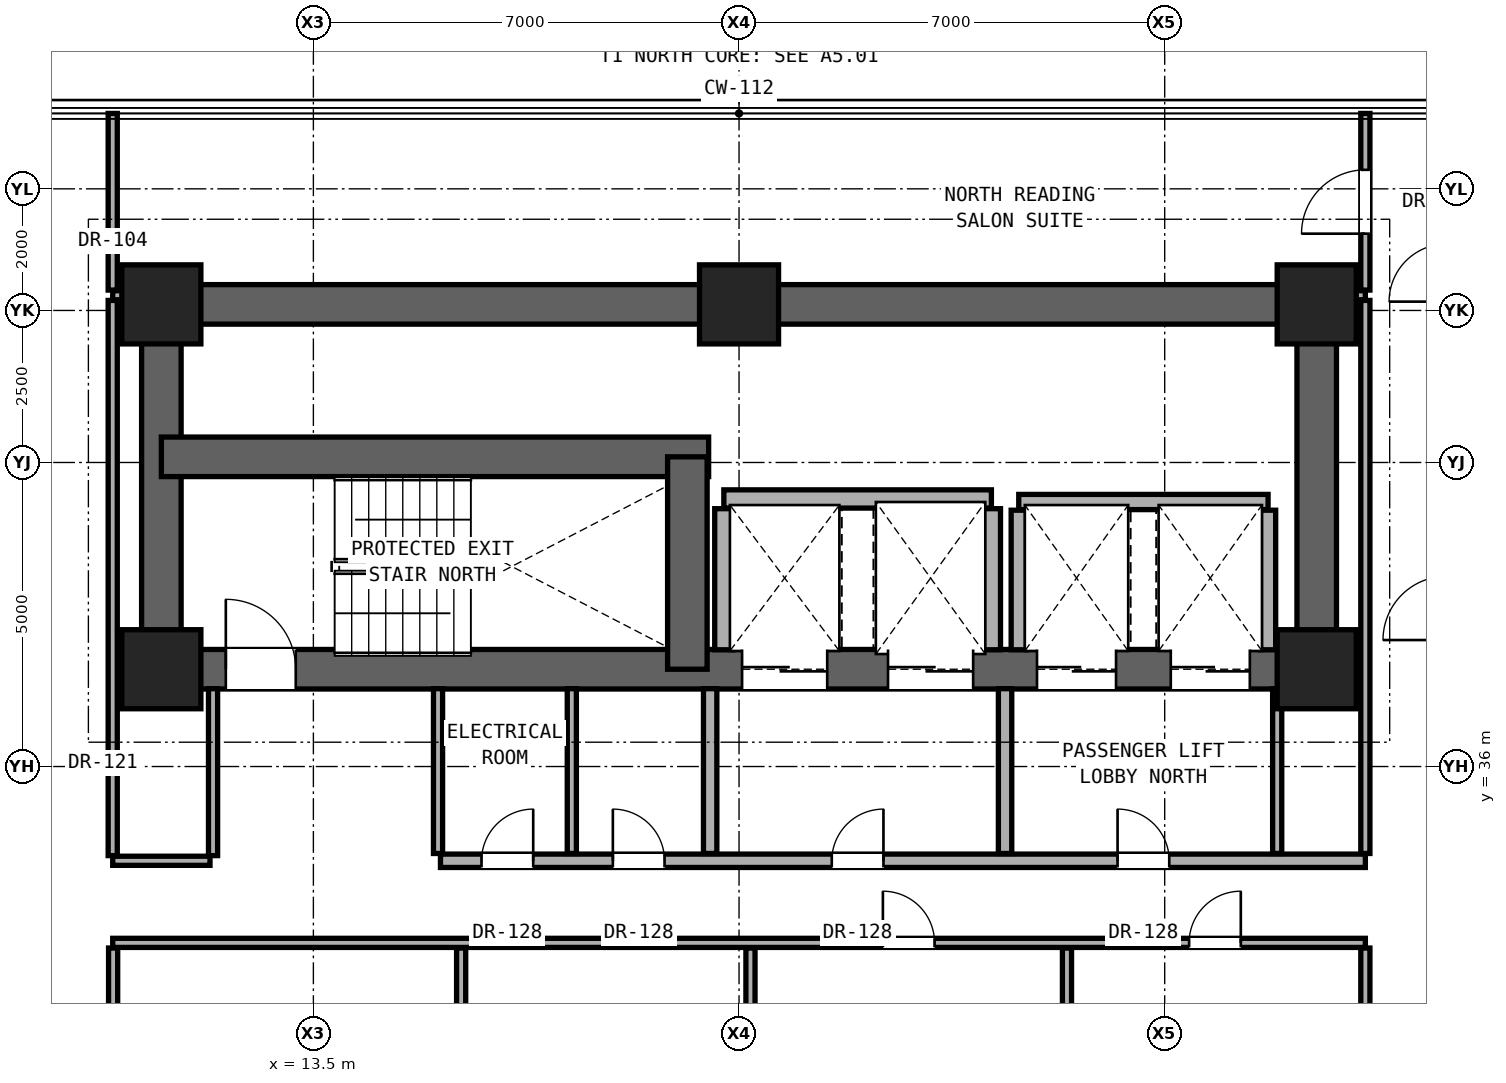
"""IFC4 building model, lengths in metres.
Left out: names, types, materials, properties, quantities, classifications, styles, units other than length and angle.
Written with IfcOpenShell. Run it as: python <this file> out.ifc"""

import sys

from ifc_helpers import new_model, si_unit, direction, frame, frame_2d, origin, origin_2d, place, context, subcontext, project, spatial, rectangle, extrude, element, fill, save


model = new_model("IFC4")
c1 = context("Model", 3, precision=1e-05, world=origin(), true_north=direction((0.0, 1.0)))
c2 = subcontext(c1, "Body", "Model", "MODEL_VIEW")
j1 = project(units=[si_unit("LENGTHUNIT", "METRE"), si_unit("PLANEANGLEUNIT", "RADIAN")], contexts=[c1])
p1 = place(None, origin())
s1 = spatial("IfcSite", under=j1, at=p1, CompositionType="ELEMENT")
p2 = place(p1, origin())
s2 = spatial("IfcBuilding", under=s1, at=p2, CompositionType="ELEMENT")
p3 = place(p2, frame((0.0, 0.0, 52.1)))
s3 = spatial("IfcBuildingStorey", under=s2, at=p3, CompositionType="ELEMENT", Elevation=52.1)
for number, where, z_axis, x_axis in (
    (1, (11.0, 37.6, 0.0), (0.0, 0.0, 1.0), (1.0, 0.0, 0.0)),
    (2, (30.0, 37.6, 0.0), (0.0, 0.0, 1.0), (1.0, 0.0, 0.0)),
    (3, (11.0, 43.6, 0.0), (0.0, 0.0, 1.0), (1.0, 0.0, 0.0)),
    (4, (20.5, 43.6, 0.0), (0.0, 0.0, 1.0), (1.0, 0.0, 0.0)),
    (5, (30.0, 43.6, 0.0), (0.0, 0.0, 1.0), (1.0, 0.0, 0.0)),
):
    element("IfcColumn", number, at=place(p3, frame(where, z_axis=z_axis, x_axis=x_axis)), inside=s3, PredefinedType="COLUMN", context=c2, shape_type="SweptSolid", body=[
        extrude(rectangle(XDim=1.3, YDim=1.3, at=origin_2d()), origin(), (0.0, 0.0, 1.0), 3.3),
    ])
p4 = place(p3, frame((11.0, 43.6, 0.0), z_axis=(0.0, 0.0, 1.0), x_axis=(1.0, 0.0, 0.0)))
e6 = element("IfcWall", 6, at=p4, inside=s3, PredefinedType="SHEAR", context=c2, shape_type="SweptSolid", body=[
    extrude(rectangle(XDim=19.0, YDim=0.65, at=frame_2d((9.5, 0.0))), origin(), (0.0, 0.0, 1.0), 3.06),
])
for number, where, z_axis, x_axis in (
    (7, (11.0, 37.6, 0.0), (0.0, 0.0, 1.0), (0.0, 1.0, 0.0)),
    (8, (30.0, 37.6, 0.0), (0.0, 0.0, 1.0), (0.0, 1.0, 0.0)),
):
    element("IfcWall", number, at=place(p3, frame(where, z_axis=z_axis, x_axis=x_axis)), inside=s3, PredefinedType="SHEAR", context=c2, shape_type="SweptSolid", body=[
        extrude(rectangle(XDim=6.0, YDim=0.65, at=frame_2d((3.0, 0.0))), origin(), (0.0, 0.0, 1.0), 3.06),
    ])
p5 = place(p3, frame((11.0, 37.6, 0.0), z_axis=(0.0, 0.0, 1.0), x_axis=(1.0, 0.0, 0.0)))
e9 = element("IfcWall", 9, at=p5, inside=s3, PredefinedType="SHEAR", context=c2, shape_type="SweptSolid", body=[
    extrude(rectangle(XDim=19.0, YDim=0.65, at=frame_2d((9.5, 0.0))), origin(), (0.0, 0.0, 1.0), 3.06),
])
p6 = place(p5, frame((1.06, 0.0, 0.0)))
e10 = element("IfcOpeningElement", 10, at=p6, cuts=e9, PredefinedType="OPENING", context=c2, shape_type="SweptSolid", body=[
    extrude(rectangle(XDim=1.15, YDim=2.2, at=frame_2d((0.575, 1.1))), frame((0.0, 0.335, 0.0), z_axis=(0.0, -1.0, 0.0), x_axis=(1.0, 0.0, 0.0)), (0.0, 0.0, 1.0), 0.67),
])
p7 = place(p5, frame((9.55, 0.0, 0.0)))
e11 = element("IfcOpeningElement", 11, at=p7, cuts=e9, PredefinedType="OPENING", context=c2, shape_type="SweptSolid", body=[
    extrude(rectangle(XDim=1.4, YDim=2.35, at=frame_2d((0.7, 1.175))), frame((0.0, 0.335, 0.0), z_axis=(0.0, -1.0, 0.0), x_axis=(1.0, 0.0, 0.0)), (0.0, 0.0, 1.0), 0.67),
])
p8 = place(p5, frame((11.95, 0.0, 0.0)))
e12 = element("IfcOpeningElement", 12, at=p8, cuts=e9, PredefinedType="OPENING", context=c2, shape_type="SweptSolid", body=[
    extrude(rectangle(XDim=1.4, YDim=2.35, at=frame_2d((0.7, 1.175))), frame((0.0, 0.335, 0.0), z_axis=(0.0, -1.0, 0.0), x_axis=(1.0, 0.0, 0.0)), (0.0, 0.0, 1.0), 0.67),
])
p9 = place(p5, frame((14.4, 0.0, 0.0)))
e13 = element("IfcOpeningElement", 13, at=p9, cuts=e9, PredefinedType="OPENING", context=c2, shape_type="SweptSolid", body=[
    extrude(rectangle(XDim=1.3, YDim=2.3, at=frame_2d((0.65, 1.15))), frame((0.0, 0.335, 0.0), z_axis=(0.0, -1.0, 0.0), x_axis=(1.0, 0.0, 0.0)), (0.0, 0.0, 1.0), 0.67),
])
p10 = place(p5, frame((16.6, 0.0, 0.0)))
e14 = element("IfcOpeningElement", 14, at=p10, cuts=e9, PredefinedType="OPENING", context=c2, shape_type="SweptSolid", body=[
    extrude(rectangle(XDim=1.3, YDim=2.3, at=frame_2d((0.65, 1.15))), frame((0.0, 0.335, 0.0), z_axis=(0.0, -1.0, 0.0), x_axis=(1.0, 0.0, 0.0)), (0.0, 0.0, 1.0), 0.67),
])
p11 = place(p3, frame((11.0, 41.093, 0.0), z_axis=(0.0, 0.0, 1.0), x_axis=(1.0, 0.0, 0.0)))
e15 = element("IfcWall", 15, at=p11, inside=s3, PredefinedType="SHEAR", context=c2, shape_type="SweptSolid", body=[
    extrude(rectangle(XDim=9.0, YDim=0.65, at=frame_2d((4.5, 0.0))), origin(), (0.0, 0.0, 1.0), 3.06),
])
p12 = place(p3, frame((19.65, 37.6, 0.0), z_axis=(0.0, 0.0, 1.0), x_axis=(0.0, 1.0, 0.0)))
e16 = element("IfcWall", 16, at=p12, inside=s3, PredefinedType="SHEAR", context=c2, shape_type="SweptSolid", body=[
    extrude(rectangle(XDim=3.493, YDim=0.65, at=frame_2d((1.747, 0.0))), origin(), (0.0, 0.0, 1.0), 3.06),
])
p13 = place(p3, frame((10.2, 33.1, 0.0), z_axis=(0.0, 0.0, 1.0), x_axis=(1.0, 0.0, 0.0)))
e17 = element("IfcWall", 17, at=p13, inside=s3, PredefinedType="PARTITIONING", context=c2, shape_type="SweptSolid", body=[
    extrude(rectangle(XDim=20.6, YDim=0.15, at=frame_2d((10.3, 0.0))), origin(), (0.0, 0.0, 1.0), 2.104),
])
p14 = place(p13, frame((12.666, 0.0, 0.0)))
e18 = element("IfcOpeningElement", 18, at=p14, cuts=e17, PredefinedType="OPENING", context=c2, shape_type="SweptSolid", body=[
    extrude(rectangle(XDim=0.85, YDim=2.01, at=frame_2d((0.425, 1.005))), frame((0.0, 0.085, 0.0), z_axis=(0.0, -1.0, 0.0), x_axis=(1.0, 0.0, 0.0)), (0.0, 0.0, 1.0), 0.17),
])
p15 = place(p13, frame((17.701, 0.0, 0.0)))
e19 = element("IfcOpeningElement", 19, at=p15, cuts=e17, PredefinedType="OPENING", context=c2, shape_type="SweptSolid", body=[
    extrude(rectangle(XDim=0.85, YDim=2.01, at=frame_2d((0.425, 1.005))), frame((0.0, 0.085, 0.0), z_axis=(0.0, -1.0, 0.0), x_axis=(1.0, 0.0, 0.0)), (0.0, 0.0, 1.0), 0.17),
])
p16 = place(p3, frame((10.2, 34.45, 0.0), z_axis=(0.0, 0.0, 1.0), x_axis=(1.0, 0.0, 0.0)))
e20 = element("IfcWall", 20, at=p16, inside=s3, PredefinedType="PARTITIONING", context=c2, shape_type="SweptSolid", body=[
    extrude(rectangle(XDim=1.6, YDim=0.15, at=frame_2d((0.8, 0.0))), origin(), (0.0, 0.0, 1.0), 2.104),
])
p17 = place(p3, frame((15.59, 34.45, 0.0), z_axis=(0.0, 0.0, 1.0), x_axis=(1.0, 0.0, 0.0)))
e21 = element("IfcWall", 21, at=p17, inside=s3, PredefinedType="SOLIDWALL", context=c2, shape_type="SweptSolid", body=[
    extrude(rectangle(XDim=15.21, YDim=0.22, at=frame_2d((7.605, 0.0))), origin(), (0.0, 0.0, 1.0), 2.104),
])
p18 = place(p17, frame((6.435, 0.0, 0.0)))
e22 = element("IfcOpeningElement", 22, at=p18, cuts=e21, PredefinedType="OPENING", context=c2, shape_type="SweptSolid", body=[
    extrude(rectangle(XDim=0.85, YDim=2.01, at=frame_2d((0.425, 1.005))), frame((0.0, 0.12, 0.0), z_axis=(0.0, -1.0, 0.0), x_axis=(1.0, 0.0, 0.0)), (0.0, 0.0, 1.0), 0.24),
])
p19 = place(p17, frame((11.135, 0.0, 0.0)))
e23 = element("IfcOpeningElement", 23, at=p19, cuts=e21, PredefinedType="OPENING", context=c2, shape_type="SweptSolid", body=[
    extrude(rectangle(XDim=0.85, YDim=2.01, at=frame_2d((0.425, 1.005))), frame((0.0, 0.12, 0.0), z_axis=(0.0, -1.0, 0.0), x_axis=(1.0, 0.0, 0.0)), (0.0, 0.0, 1.0), 0.24),
])
p20 = place(p17, frame((0.675, 0.0, 0.0)))
e24 = element("IfcOpeningElement", 24, at=p20, cuts=e21, PredefinedType="OPENING", context=c2, shape_type="SweptSolid", body=[
    extrude(rectangle(XDim=0.85, YDim=2.01, at=frame_2d((0.425, 1.005))), frame((0.0, 0.12, 0.0), z_axis=(0.0, -1.0, 0.0), x_axis=(1.0, 0.0, 0.0)), (0.0, 0.0, 1.0), 0.24),
])
p21 = place(p17, frame((2.835, 0.0, 0.0)))
e25 = element("IfcOpeningElement", 25, at=p21, cuts=e21, PredefinedType="OPENING", context=c2, shape_type="SweptSolid", body=[
    extrude(rectangle(XDim=0.85, YDim=2.01, at=frame_2d((0.425, 1.005))), frame((0.0, 0.12, 0.0), z_axis=(0.0, -1.0, 0.0), x_axis=(1.0, 0.0, 0.0)), (0.0, 0.0, 1.0), 0.24),
])
p22 = place(p3, frame((25.1, 40.35, 0.0), z_axis=(0.0, 0.0, 1.0), x_axis=(1.0, 0.0, 0.0)))
e26 = element("IfcWall", 26, at=p22, inside=s3, PredefinedType="SOLIDWALL", context=c2, shape_type="SweptSolid", body=[
    extrude(rectangle(XDim=4.1, YDim=0.25, at=frame_2d((2.05, 0.0))), origin(), (0.0, 0.0, 1.0), 3.06),
])
p23 = place(p3, frame((20.25, 40.4, 0.0), z_axis=(0.0, 0.0, 1.0), x_axis=(1.0, 0.0, 0.0)))
e27 = element("IfcWall", 27, at=p23, inside=s3, PredefinedType="SOLIDWALL", context=c2, shape_type="SweptSolid", body=[
    extrude(rectangle(XDim=4.4, YDim=0.3, at=frame_2d((2.2, 0.0))), origin(), (0.0, 0.0, 1.0), 3.06),
])
for number, where, z_axis, x_axis in (
    (28, (10.2, 43.75, 0.0), (0.0, 0.0, 1.0), (1.0, 0.0, 0.0)),
    (29, (30.32, 43.75, 0.0), (0.0, 0.0, 1.0), (1.0, 0.0, 0.0)),
):
    element("IfcWall", number, at=place(p3, frame(where, z_axis=z_axis, x_axis=x_axis)), inside=s3, PredefinedType="PARTITIONING", context=c2, shape_type="SweptSolid", body=[
        extrude(rectangle(XDim=0.48, YDim=0.15, at=frame_2d((0.24, 0.0))), origin(), (0.0, 0.0, 1.0), 3.06),
    ])
p24 = place(p3, frame((10.207, 22.935, 0.0), z_axis=(0.0, 0.0, 1.0), x_axis=(0.0, 1.0, 0.0)))
e30 = element("IfcWall", 30, at=p24, inside=s3, PredefinedType="PARTITIONING", context=c2, shape_type="SweptSolid", body=[
    extrude(rectangle(XDim=10.08, YDim=0.15, at=frame_2d((5.04, 0.0))), origin(), (0.0, 0.0, 1.0), 2.279),
])
p25 = place(p24, frame((4.565, 0.0, 0.0)))
e31 = element("IfcOpeningElement", 31, at=p25, cuts=e30, PredefinedType="OPENING", context=c2, shape_type="SweptSolid", body=[
    extrude(rectangle(XDim=0.95, YDim=2.15, at=frame_2d((0.475, 1.075))), frame((0.0, 0.085, 0.0), z_axis=(0.0, -1.0, 0.0), x_axis=(1.0, 0.0, 0.0)), (0.0, 0.0, 1.0), 0.17),
])
p26 = place(p3, frame((10.2, 34.535, 0.0), z_axis=(0.0, 0.0, 1.0), x_axis=(0.0, 1.0, 0.0)))
e32 = element("IfcWall", 32, at=p26, inside=s3, PredefinedType="PARTITIONING", context=c2, shape_type="SweptSolid", body=[
    extrude(rectangle(XDim=9.13, YDim=0.15, at=frame_2d((4.565, 0.0))), origin(), (0.0, 0.0, 1.0), 2.436),
])
p27 = place(p3, frame((10.2, 43.835, 0.0), z_axis=(0.0, 0.0, 1.0), x_axis=(0.0, 1.0, 0.0)))
e33 = element("IfcWall", 33, at=p27, inside=s3, PredefinedType="PARTITIONING", context=c2, shape_type="SweptSolid", body=[
    extrude(rectangle(XDim=2.905, YDim=0.15, at=frame_2d((1.453, 0.0))), origin(), (0.0, 0.0, 1.0), 3.06),
])
p28 = place(p3, frame((11.85, 34.535, 0.0), z_axis=(0.0, 0.0, 1.0), x_axis=(0.0, 1.0, 0.0)))
e34 = element("IfcWall", 34, at=p28, inside=s3, PredefinedType="PARTITIONING", context=c2, shape_type="SweptSolid", body=[
    extrude(rectangle(XDim=2.745, YDim=0.15, at=frame_2d((1.373, 0.0))), origin(), (0.0, 0.0, 1.0), 3.06),
])
p29 = place(p3, frame((15.55, 34.57, 0.0), z_axis=(0.0, 0.0, 1.0), x_axis=(0.0, 1.0, 0.0)))
e35 = element("IfcWall", 35, at=p29, inside=s3, PredefinedType="PARTITIONING", context=c2, shape_type="SweptSolid", body=[
    extrude(rectangle(XDim=2.71, YDim=0.15, at=frame_2d((1.355, 0.0))), origin(), (0.0, 0.0, 1.0), 2.589),
])
p30 = place(p3, frame((15.93, 22.935, 0.0), z_axis=(0.0, 0.0, 1.0), x_axis=(0.0, 1.0, 0.0)))
e36 = element("IfcWall", 36, at=p30, inside=s3, PredefinedType="PARTITIONING", context=c2, shape_type="SweptSolid", body=[
    extrude(rectangle(XDim=10.08, YDim=0.15, at=frame_2d((5.04, 0.0))), origin(), (0.0, 0.0, 1.0), 2.104),
])
p31 = place(p3, frame((17.75, 34.57, 0.0), z_axis=(0.0, 0.0, 1.0), x_axis=(0.0, 1.0, 0.0)))
e37 = element("IfcWall", 37, at=p31, inside=s3, PredefinedType="PARTITIONING", context=c2, shape_type="SweptSolid", body=[
    extrude(rectangle(XDim=2.71, YDim=0.15, at=frame_2d((1.355, 0.0))), origin(), (0.0, 0.0, 1.0), 3.06),
])
p32 = place(p3, frame((20.025, 34.57, 0.0), z_axis=(0.0, 0.0, 1.0), x_axis=(0.0, 1.0, 0.0)))
e38 = element("IfcWall", 38, at=p32, inside=s3, PredefinedType="SOLIDWALL", context=c2, shape_type="SweptSolid", body=[
    extrude(rectangle(XDim=2.71, YDim=0.22, at=frame_2d((1.355, 0.0))), origin(), (0.0, 0.0, 1.0), 3.06),
])
p33 = place(p3, frame((20.25, 37.92, 0.0), z_axis=(0.0, 0.0, 1.0), x_axis=(0.0, 1.0, 0.0)))
e39 = element("IfcWall", 39, at=p33, inside=s3, PredefinedType="SOLIDWALL", context=c2, shape_type="SweptSolid", body=[
    extrude(rectangle(XDim=2.32, YDim=0.3, at=frame_2d((1.16, 0.0))), origin(), (0.0, 0.0, 1.0), 3.06),
])
p34 = place(p3, frame((20.688, 19.985, 0.0), z_axis=(0.0, 0.0, 1.0), x_axis=(0.0, 1.0, 0.0)))
e40 = element("IfcWall", 40, at=p34, inside=s3, PredefinedType="PARTITIONING", context=c2, shape_type="SweptSolid", body=[
    extrude(rectangle(XDim=13.03, YDim=0.15, at=frame_2d((6.515, 0.0))), origin(), (0.0, 0.0, 1.0), 2.104),
])
p35 = place(p3, frame((24.65, 37.92, 0.0), z_axis=(0.0, 0.0, 1.0), x_axis=(0.0, 1.0, 0.0)))
e41 = element("IfcWall", 41, at=p35, inside=s3, PredefinedType="SOLIDWALL", context=c2, shape_type="SweptSolid", body=[
    extrude(rectangle(XDim=2.32, YDim=0.3, at=frame_2d((1.16, 0.0))), origin(), (0.0, 0.0, 1.0), 3.06),
])
p36 = place(p3, frame((24.875, 34.57, 0.0), z_axis=(0.0, 0.0, 1.0), x_axis=(0.0, 1.0, 0.0)))
e42 = element("IfcWall", 42, at=p36, inside=s3, PredefinedType="SOLIDWALL", context=c2, shape_type="SweptSolid", body=[
    extrude(rectangle(XDim=2.71, YDim=0.22, at=frame_2d((1.355, 0.0))), origin(), (0.0, 0.0, 1.0), 3.06),
])
p37 = place(p3, frame((25.1, 37.92, 0.0), z_axis=(0.0, 0.0, 1.0), x_axis=(0.0, 1.0, 0.0)))
e43 = element("IfcWall", 43, at=p37, inside=s3, PredefinedType="SOLIDWALL", context=c2, shape_type="SweptSolid", body=[
    extrude(rectangle(XDim=2.295, YDim=0.25, at=frame_2d((1.147, 0.0))), origin(), (0.0, 0.0, 1.0), 3.06),
])
p38 = place(p3, frame((25.893, 19.985, 0.0), z_axis=(0.0, 0.0, 1.0), x_axis=(0.0, 1.0, 0.0)))
e44 = element("IfcWall", 44, at=p38, inside=s3, PredefinedType="PARTITIONING", context=c2, shape_type="SweptSolid", body=[
    extrude(rectangle(XDim=13.03, YDim=0.15, at=frame_2d((6.515, 0.0))), origin(), (0.0, 0.0, 1.0), 2.104),
])
p39 = place(p3, frame((29.35, 34.57, 0.0), z_axis=(0.0, 0.0, 1.0), x_axis=(0.0, 1.0, 0.0)))
e45 = element("IfcWall", 45, at=p39, inside=s3, PredefinedType="PARTITIONING", context=c2, shape_type="SweptSolid", body=[
    extrude(rectangle(XDim=2.71, YDim=0.15, at=frame_2d((1.355, 0.0))), origin(), (0.0, 0.0, 1.0), 3.06),
])
p40 = place(p3, frame((29.2, 37.92, 0.0), z_axis=(0.0, 0.0, 1.0), x_axis=(0.0, 1.0, 0.0)))
e46 = element("IfcWall", 46, at=p40, inside=s3, PredefinedType="SOLIDWALL", context=c2, shape_type="SweptSolid", body=[
    extrude(rectangle(XDim=2.295, YDim=0.25, at=frame_2d((1.147, 0.0))), origin(), (0.0, 0.0, 1.0), 3.06),
])
p41 = place(p3, frame((30.8, 19.985, 0.0), z_axis=(0.0, 0.0, 1.0), x_axis=(0.0, 1.0, 0.0)))
e47 = element("IfcWall", 47, at=p41, inside=s3, PredefinedType="PARTITIONING", context=c2, shape_type="SweptSolid", body=[
    extrude(rectangle(XDim=13.03, YDim=0.15, at=frame_2d((6.515, 0.0))), origin(), (0.0, 0.0, 1.0), 2.279),
])
p42 = place(p3, frame((30.8, 34.57, 0.0), z_axis=(0.0, 0.0, 1.0), x_axis=(0.0, 1.0, 0.0)))
e48 = element("IfcWall", 48, at=p42, inside=s3, PredefinedType="PARTITIONING", context=c2, shape_type="SweptSolid", body=[
    extrude(rectangle(XDim=9.095, YDim=0.15, at=frame_2d((4.547, 0.0))), origin(), (0.0, 0.0, 1.0), 2.436),
])
p43 = place(p3, frame((30.8, 43.835, 0.0), z_axis=(0.0, 0.0, 1.0), x_axis=(0.0, 1.0, 0.0)))
e49 = element("IfcWall", 49, at=p43, inside=s3, PredefinedType="PARTITIONING", context=c2, shape_type="SweptSolid", body=[
    extrude(rectangle(XDim=2.905, YDim=0.15, at=frame_2d((1.453, 0.0))), origin(), (0.0, 0.0, 1.0), 3.06),
])
p44 = place(p43, frame((0.927, 0.0, 0.0)))
e50 = element("IfcOpeningElement", 50, at=p44, cuts=e49, PredefinedType="OPENING", context=c2, shape_type="SweptSolid", body=[
    extrude(rectangle(XDim=1.05, YDim=2.2, at=frame_2d((0.525, 1.1))), frame((0.0, 0.085, 0.0), z_axis=(0.0, -1.0, 0.0), x_axis=(1.0, 0.0, 0.0)), (0.0, 0.0, 1.0), 0.17),
])
p45 = place(p6, origin())
e51 = element("IfcDoor", 51, at=p45, inside=s3, OperationType="SINGLE_SWING_LEFT", PredefinedType="DOOR", context=c2, shape_type="SweptSolid", body=[
    extrude(rectangle(XDim=1.15, YDim=2.2, at=frame_2d((0.575, 1.1))), frame((0.0, 0.025, 0.0), z_axis=(0.0, -1.0, 0.0), x_axis=(1.0, 0.0, 0.0)), (0.0, 0.0, 1.0), 0.05),
])
fill(e10, e51)
p46 = place(p18, origin())
e52 = element("IfcDoor", 52, at=p46, inside=s3, OperationType="SINGLE_SWING_RIGHT", PredefinedType="DOOR", context=c2, shape_type="SweptSolid", body=[
    extrude(rectangle(XDim=0.85, YDim=2.01, at=frame_2d((0.425, 1.005))), frame((0.0, 0.025, 0.0), z_axis=(0.0, -1.0, 0.0), x_axis=(1.0, 0.0, 0.0)), (0.0, 0.0, 1.0), 0.05),
])
fill(e22, e52)
p47 = place(p19, origin())
e53 = element("IfcDoor", 53, at=p47, inside=s3, OperationType="SINGLE_SWING_LEFT", PredefinedType="DOOR", context=c2, shape_type="SweptSolid", body=[
    extrude(rectangle(XDim=0.85, YDim=2.01, at=frame_2d((0.425, 1.005))), frame((0.0, 0.025, 0.0), z_axis=(0.0, -1.0, 0.0), x_axis=(1.0, 0.0, 0.0)), (0.0, 0.0, 1.0), 0.05),
])
fill(e23, e53)
p48 = place(p20, origin())
e54 = element("IfcDoor", 54, at=p48, inside=s3, OperationType="SINGLE_SWING_RIGHT", PredefinedType="DOOR", context=c2, shape_type="SweptSolid", body=[
    extrude(rectangle(XDim=0.85, YDim=2.01, at=frame_2d((0.425, 1.005))), frame((0.0, 0.025, 0.0), z_axis=(0.0, -1.0, 0.0), x_axis=(1.0, 0.0, 0.0)), (0.0, 0.0, 1.0), 0.05),
])
fill(e24, e54)
p49 = place(p21, origin())
e55 = element("IfcDoor", 55, at=p49, inside=s3, OperationType="SINGLE_SWING_LEFT", PredefinedType="DOOR", context=c2, shape_type="SweptSolid", body=[
    extrude(rectangle(XDim=0.85, YDim=2.01, at=frame_2d((0.425, 1.005))), frame((0.0, 0.025, 0.0), z_axis=(0.0, -1.0, 0.0), x_axis=(1.0, 0.0, 0.0)), (0.0, 0.0, 1.0), 0.05),
])
fill(e25, e55)
p50 = place(p14, origin())
e56 = element("IfcDoor", 56, at=p50, inside=s3, OperationType="SINGLE_SWING_LEFT", PredefinedType="DOOR", context=c2, shape_type="SweptSolid", body=[
    extrude(rectangle(XDim=0.85, YDim=2.01, at=frame_2d((0.425, 1.005))), frame((0.0, 0.025, 0.0), z_axis=(0.0, -1.0, 0.0), x_axis=(1.0, 0.0, 0.0)), (0.0, 0.0, 1.0), 0.05),
])
fill(e18, e56)
p51 = place(p15, origin())
e57 = element("IfcDoor", 57, at=p51, inside=s3, OperationType="SINGLE_SWING_RIGHT", PredefinedType="DOOR", context=c2, shape_type="SweptSolid", body=[
    extrude(rectangle(XDim=0.85, YDim=2.01, at=frame_2d((0.425, 1.005))), frame((0.0, 0.025, 0.0), z_axis=(0.0, -1.0, 0.0), x_axis=(1.0, 0.0, 0.0)), (0.0, 0.0, 1.0), 0.05),
])
fill(e19, e57)
p52 = place(p44, origin())
e58 = element("IfcDoor", 58, at=p52, inside=s3, OperationType="SINGLE_SWING_LEFT", PredefinedType="DOOR", context=c2, shape_type="SweptSolid", body=[
    extrude(rectangle(XDim=1.05, YDim=2.2, at=frame_2d((0.525, 1.1))), frame((0.0, 0.025, 0.0), z_axis=(0.0, -1.0, 0.0), x_axis=(1.0, 0.0, 0.0)), (0.0, 0.0, 1.0), 0.05),
])
fill(e50, e58)
p53 = place(p7, origin())
e59 = element("IfcDoor", 59, at=p53, inside=s3, OperationType="DOUBLE_DOOR_SLIDING", PredefinedType="DOOR", context=c2, shape_type="SweptSolid", body=[
    extrude(rectangle(XDim=1.4, YDim=2.35, at=frame_2d((0.7, 1.175))), frame((0.0, 0.025, 0.0), z_axis=(0.0, -1.0, 0.0), x_axis=(1.0, 0.0, 0.0)), (0.0, 0.0, 1.0), 0.05),
])
fill(e11, e59)
p54 = place(p8, origin())
e60 = element("IfcDoor", 60, at=p54, inside=s3, OperationType="DOUBLE_DOOR_SLIDING", PredefinedType="DOOR", context=c2, shape_type="SweptSolid", body=[
    extrude(rectangle(XDim=1.4, YDim=2.35, at=frame_2d((0.7, 1.175))), frame((0.0, 0.025, 0.0), z_axis=(0.0, -1.0, 0.0), x_axis=(1.0, 0.0, 0.0)), (0.0, 0.0, 1.0), 0.05),
])
fill(e12, e60)
p55 = place(p9, origin())
e61 = element("IfcDoor", 61, at=p55, inside=s3, OperationType="DOUBLE_DOOR_SLIDING", PredefinedType="DOOR", context=c2, shape_type="SweptSolid", body=[
    extrude(rectangle(XDim=1.3, YDim=2.3, at=frame_2d((0.65, 1.15))), frame((0.0, 0.025, 0.0), z_axis=(0.0, -1.0, 0.0), x_axis=(1.0, 0.0, 0.0)), (0.0, 0.0, 1.0), 0.05),
])
fill(e13, e61)
p56 = place(p10, origin())
e62 = element("IfcDoor", 62, at=p56, inside=s3, OperationType="DOUBLE_DOOR_SLIDING", PredefinedType="DOOR", context=c2, shape_type="SweptSolid", body=[
    extrude(rectangle(XDim=1.3, YDim=2.3, at=frame_2d((0.65, 1.15))), frame((0.0, 0.025, 0.0), z_axis=(0.0, -1.0, 0.0), x_axis=(1.0, 0.0, 0.0)), (0.0, 0.0, 1.0), 0.05),
])
fill(e14, e62)
save(model, sys.argv[1])
